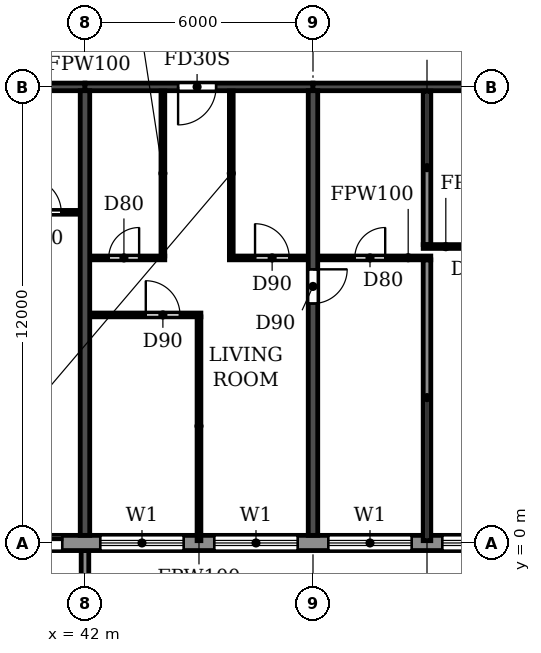
"""IFC4 building model, lengths in metres.
Left out: names, types, materials, properties, quantities, classifications, styles, units other than length and angle.
Written with IfcOpenShell. Run it as: python <this file> out.ifc"""

import sys

from ifc_helpers import new_model, si_unit, direction, frame, frame_2d, origin, place, context, subcontext, project, spatial, polyline, rectangle, outline, extrude, source, transform, mapped, element, fill, save


model = new_model("IFC4")
c1 = context("Model", 3, precision=1e-05, world=origin(), true_north=direction((0.0, 1.0)))
c2 = subcontext(c1, "Body", "Model", "MODEL_VIEW")
j1 = project(units=[si_unit("LENGTHUNIT", "METRE"), si_unit("PLANEANGLEUNIT", "RADIAN")], contexts=[c1])
p1 = place(None, origin())
s1 = spatial("IfcSite", under=j1, at=p1, CompositionType="ELEMENT")
p2 = place(p1, origin())
s2 = spatial("IfcBuilding", under=s1, at=p2, CompositionType="ELEMENT")
p3 = place(p2, frame((0.0, 0.0, 241.2)))
s3 = spatial("IfcBuildingStorey", under=s2, at=p3, CompositionType="ELEMENT", Elevation=241.2)
p4 = place(p3, frame((42.0, 0.2, 0.0), z_axis=(0.0, 0.0, 1.0), x_axis=(0.0, 1.0, 0.0)))
e1 = element("IfcWall", 1, at=p4, inside=s3, PredefinedType="SHEAR", context=c2, shape_type="SweptSolid", body=[
    extrude(rectangle(XDim=11.7, YDim=0.25, at=frame_2d((5.85, 0.0))), origin(), (0.0, 0.0, 1.0), 3.08),
])
p5 = place(p3, frame((48.0, 0.2, 0.0), z_axis=(0.0, 0.0, 1.0), x_axis=(0.0, 1.0, 0.0)))
e2 = element("IfcWall", 2, at=p5, inside=s3, PredefinedType="SHEAR", context=c2, shape_type="SweptSolid", body=[
    extrude(rectangle(XDim=11.7, YDim=0.25, at=frame_2d((5.85, 0.0))), origin(), (0.0, 0.0, 1.0), 3.08),
])
p6 = place(p5, frame((6.1, 0.0, 0.0)))
e3 = element("IfcOpeningElement", 3, at=p6, cuts=e2, PredefinedType="OPENING", context=c2, shape_type="SweptSolid", body=[
    extrude(rectangle(XDim=0.9, YDim=2.1, at=frame_2d((0.45, 1.05))), frame((0.0, 0.135, 0.0), z_axis=(0.0, -1.0, 0.0), x_axis=(1.0, 0.0, 0.0)), (0.0, 0.0, 1.0), 0.27),
])
p7 = place(p3, frame((36.0, 12.0, 0.0), z_axis=(0.0, 0.0, 1.0), x_axis=(1.0, 0.0, 0.0)))
e4 = element("IfcWall", 4, at=p7, inside=s3, PredefinedType="SHEAR", context=c2, shape_type="SweptSolid", body=[
    extrude(rectangle(XDim=6.0, YDim=0.2, at=frame_2d((3.0, 0.0))), origin(), (0.0, 0.0, 1.0), 2.48),
])
p8 = place(p7, frame((2.45, 0.0, 0.0)))
e5 = element("IfcOpeningElement", 5, at=p8, cuts=e4, PredefinedType="OPENING", context=c2, shape_type="SweptSolid", body=[
    extrude(rectangle(XDim=1.0, YDim=2.1, at=frame_2d((0.5, 1.05))), frame((0.0, 0.11, 0.0), z_axis=(0.0, -1.0, 0.0), x_axis=(1.0, 0.0, 0.0)), (0.0, 0.0, 1.0), 0.22),
])
p9 = place(p3, frame((42.0, 12.0, 0.0), z_axis=(0.0, 0.0, 1.0), x_axis=(1.0, 0.0, 0.0)))
e6 = element("IfcWall", 6, at=p9, inside=s3, PredefinedType="SHEAR", context=c2, shape_type="SweptSolid", body=[
    extrude(rectangle(XDim=6.0, YDim=0.2, at=frame_2d((3.0, 0.0))), origin(), (0.0, 0.0, 1.0), 2.48),
])
p10 = place(p9, frame((2.45, 0.0, 0.0)))
e7 = element("IfcOpeningElement", 7, at=p10, cuts=e6, PredefinedType="OPENING", context=c2, shape_type="SweptSolid", body=[
    extrude(rectangle(XDim=1.0, YDim=2.1, at=frame_2d((0.5, 1.05))), frame((0.0, 0.11, 0.0), z_axis=(0.0, -1.0, 0.0), x_axis=(1.0, 0.0, 0.0)), (0.0, 0.0, 1.0), 0.22),
])
p11 = place(p3, frame((48.0, 12.0, 0.0), z_axis=(0.0, 0.0, 1.0), x_axis=(1.0, 0.0, 0.0)))
e8 = element("IfcWall", 8, at=p11, inside=s3, PredefinedType="SHEAR", context=c2, shape_type="SweptSolid", body=[
    extrude(rectangle(XDim=6.0, YDim=0.2, at=frame_2d((3.0, 0.0))), origin(), (0.0, 0.0, 1.0), 2.48),
])
p12 = place(p3, frame((22.683, 0.0, 0.0), z_axis=(0.0, 0.0, 1.0), x_axis=(1.0, 0.0, 0.0)))
e9 = element("IfcWall", 9, at=p12, inside=s3, PredefinedType="STANDARD", context=c2, shape_type="SweptSolid", body=[
    extrude(rectangle(XDim=56.634, YDim=0.4, at=frame_2d((28.317, 0.0))), origin(), (0.0, 0.0, 1.0), 3.08),
])
p13 = place(p12, frame((1.717, 0.0, 0.9)))
e10 = element("IfcOpeningElement", 10, at=p13, cuts=e9, PredefinedType="OPENING", context=c2, shape_type="SweptSolid", body=[
    extrude(rectangle(XDim=2.2, YDim=1.5, at=frame_2d((1.1, 0.75))), frame((0.0, 0.21, 0.0), z_axis=(0.0, -1.0, 0.0), x_axis=(1.0, 0.0, 0.0)), (0.0, 0.0, 1.0), 0.42),
])
p14 = place(p12, frame((4.917, 0.0, 0.0)))
e11 = element("IfcOpeningElement", 11, at=p14, cuts=e9, PredefinedType="OPENING", context=c2, shape_type="SweptSolid", body=[
    extrude(rectangle(XDim=1.8, YDim=2.4, at=frame_2d((0.9, 1.2))), frame((0.0, 0.21, 0.0), z_axis=(0.0, -1.0, 0.0), x_axis=(1.0, 0.0, 0.0)), (0.0, 0.0, 1.0), 0.42),
])
p15 = place(p12, frame((7.717, 0.0, 0.9)))
e12 = element("IfcOpeningElement", 12, at=p15, cuts=e9, PredefinedType="OPENING", context=c2, shape_type="SweptSolid", body=[
    extrude(rectangle(XDim=2.2, YDim=1.5, at=frame_2d((1.1, 0.75))), frame((0.0, 0.21, 0.0), z_axis=(0.0, -1.0, 0.0), x_axis=(1.0, 0.0, 0.0)), (0.0, 0.0, 1.0), 0.42),
])
p16 = place(p12, frame((10.717, 0.0, 0.9)))
e13 = element("IfcOpeningElement", 13, at=p16, cuts=e9, PredefinedType="OPENING", context=c2, shape_type="SweptSolid", body=[
    extrude(rectangle(XDim=2.2, YDim=1.5, at=frame_2d((1.1, 0.75))), frame((0.0, 0.21, 0.0), z_axis=(0.0, -1.0, 0.0), x_axis=(1.0, 0.0, 0.0)), (0.0, 0.0, 1.0), 0.42),
])
p17 = place(p12, frame((13.717, 0.0, 0.9)))
e14 = element("IfcOpeningElement", 14, at=p17, cuts=e9, PredefinedType="OPENING", context=c2, shape_type="SweptSolid", body=[
    extrude(rectangle(XDim=2.2, YDim=1.5, at=frame_2d((1.1, 0.75))), frame((0.0, 0.21, 0.0), z_axis=(0.0, -1.0, 0.0), x_axis=(1.0, 0.0, 0.0)), (0.0, 0.0, 1.0), 0.42),
])
p18 = place(p12, frame((16.917, 0.0, 0.0)))
e15 = element("IfcOpeningElement", 15, at=p18, cuts=e9, PredefinedType="OPENING", context=c2, shape_type="SweptSolid", body=[
    extrude(rectangle(XDim=1.8, YDim=2.4, at=frame_2d((0.9, 1.2))), frame((0.0, 0.21, 0.0), z_axis=(0.0, -1.0, 0.0), x_axis=(1.0, 0.0, 0.0)), (0.0, 0.0, 1.0), 0.42),
])
p19 = place(p12, frame((19.717, 0.0, 0.9)))
e16 = element("IfcOpeningElement", 16, at=p19, cuts=e9, PredefinedType="OPENING", context=c2, shape_type="SweptSolid", body=[
    extrude(rectangle(XDim=2.2, YDim=1.5, at=frame_2d((1.1, 0.75))), frame((0.0, 0.21, 0.0), z_axis=(0.0, -1.0, 0.0), x_axis=(1.0, 0.0, 0.0)), (0.0, 0.0, 1.0), 0.42),
])
p20 = place(p12, frame((22.717, 0.0, 0.9)))
e17 = element("IfcOpeningElement", 17, at=p20, cuts=e9, PredefinedType="OPENING", context=c2, shape_type="SweptSolid", body=[
    extrude(rectangle(XDim=2.2, YDim=1.5, at=frame_2d((1.1, 0.75))), frame((0.0, 0.21, 0.0), z_axis=(0.0, -1.0, 0.0), x_axis=(1.0, 0.0, 0.0)), (0.0, 0.0, 1.0), 0.42),
])
p21 = place(p12, frame((25.717, 0.0, 0.9)))
e18 = element("IfcOpeningElement", 18, at=p21, cuts=e9, PredefinedType="OPENING", context=c2, shape_type="SweptSolid", body=[
    extrude(rectangle(XDim=2.2, YDim=1.5, at=frame_2d((1.1, 0.75))), frame((0.0, 0.21, 0.0), z_axis=(0.0, -1.0, 0.0), x_axis=(1.0, 0.0, 0.0)), (0.0, 0.0, 1.0), 0.42),
])
p22 = place(p12, frame((28.717, 0.0, 0.9)))
e19 = element("IfcOpeningElement", 19, at=p22, cuts=e9, PredefinedType="OPENING", context=c2, shape_type="SweptSolid", body=[
    extrude(rectangle(XDim=2.2, YDim=1.5, at=frame_2d((1.1, 0.75))), frame((0.0, 0.21, 0.0), z_axis=(0.0, -1.0, 0.0), x_axis=(1.0, 0.0, 0.0)), (0.0, 0.0, 1.0), 0.42),
])
p23 = place(p12, frame((31.717, 0.0, 0.9)))
e20 = element("IfcOpeningElement", 20, at=p23, cuts=e9, PredefinedType="OPENING", context=c2, shape_type="SweptSolid", body=[
    extrude(rectangle(XDim=2.2, YDim=1.5, at=frame_2d((1.1, 0.75))), frame((0.0, 0.21, 0.0), z_axis=(0.0, -1.0, 0.0), x_axis=(1.0, 0.0, 0.0)), (0.0, 0.0, 1.0), 0.42),
])
p24 = place(p12, frame((34.717, 0.0, 0.9)))
e21 = element("IfcOpeningElement", 21, at=p24, cuts=e9, PredefinedType="OPENING", context=c2, shape_type="SweptSolid", body=[
    extrude(rectangle(XDim=2.2, YDim=1.5, at=frame_2d((1.1, 0.75))), frame((0.0, 0.21, 0.0), z_axis=(0.0, -1.0, 0.0), x_axis=(1.0, 0.0, 0.0)), (0.0, 0.0, 1.0), 0.42),
])
p25 = place(p12, frame((37.917, 0.0, 0.0)))
e22 = element("IfcOpeningElement", 22, at=p25, cuts=e9, PredefinedType="OPENING", context=c2, shape_type="SweptSolid", body=[
    extrude(rectangle(XDim=1.8, YDim=2.4, at=frame_2d((0.9, 1.2))), frame((0.0, 0.21, 0.0), z_axis=(0.0, -1.0, 0.0), x_axis=(1.0, 0.0, 0.0)), (0.0, 0.0, 1.0), 0.42),
])
p26 = place(p12, frame((40.717, 0.0, 0.9)))
e23 = element("IfcOpeningElement", 23, at=p26, cuts=e9, PredefinedType="OPENING", context=c2, shape_type="SweptSolid", body=[
    extrude(rectangle(XDim=2.2, YDim=1.5, at=frame_2d((1.1, 0.75))), frame((0.0, 0.21, 0.0), z_axis=(0.0, -1.0, 0.0), x_axis=(1.0, 0.0, 0.0)), (0.0, 0.0, 1.0), 0.42),
])
p27 = place(p12, frame((43.717, 0.0, 0.9)))
e24 = element("IfcOpeningElement", 24, at=p27, cuts=e9, PredefinedType="OPENING", context=c2, shape_type="SweptSolid", body=[
    extrude(rectangle(XDim=2.2, YDim=1.5, at=frame_2d((1.1, 0.75))), frame((0.0, 0.21, 0.0), z_axis=(0.0, -1.0, 0.0), x_axis=(1.0, 0.0, 0.0)), (0.0, 0.0, 1.0), 0.42),
])
p28 = place(p12, frame((46.717, 0.0, 0.9)))
e25 = element("IfcOpeningElement", 25, at=p28, cuts=e9, PredefinedType="OPENING", context=c2, shape_type="SweptSolid", body=[
    extrude(rectangle(XDim=2.2, YDim=1.5, at=frame_2d((1.1, 0.75))), frame((0.0, 0.21, 0.0), z_axis=(0.0, -1.0, 0.0), x_axis=(1.0, 0.0, 0.0)), (0.0, 0.0, 1.0), 0.42),
])
p29 = place(p12, frame((49.717, 0.0, 0.9)))
e26 = element("IfcOpeningElement", 26, at=p29, cuts=e9, PredefinedType="OPENING", context=c2, shape_type="SweptSolid", body=[
    extrude(rectangle(XDim=2.2, YDim=1.5, at=frame_2d((1.1, 0.75))), frame((0.0, 0.21, 0.0), z_axis=(0.0, -1.0, 0.0), x_axis=(1.0, 0.0, 0.0)), (0.0, 0.0, 1.0), 0.42),
])
p30 = place(p12, frame((52.917, 0.0, 0.0)))
e27 = element("IfcOpeningElement", 27, at=p30, cuts=e9, PredefinedType="OPENING", context=c2, shape_type="SweptSolid", body=[
    extrude(rectangle(XDim=1.8, YDim=2.4, at=frame_2d((0.9, 1.2))), frame((0.0, 0.21, 0.0), z_axis=(0.0, -1.0, 0.0), x_axis=(1.0, 0.0, 0.0)), (0.0, 0.0, 1.0), 0.42),
])
m1 = source(origin(), c2, "Body", "SweptSolid", [
    extrude(outline(polyline([(0.0, 0.0), (0.2, 0.0), (0.2, 1.65), (0.0, 1.65), (0.0, 0.0)])), origin(), (0.0, 0.0, 1.0), 3.1),
])
p31 = place(p3, frame((41.9, -1.85, 0.0)))
e28 = element("IfcWall", 28, at=p31, inside=s3, PredefinedType="STANDARD", context=c2, shape_type="MappedRepresentation", body=[
    mapped(m1, transform((0.0, 0.0, 0.0))),
])
p32 = place(p3, frame((51.0, 0.06, 0.0), z_axis=(0.0, 0.0, 1.0), x_axis=(0.0, 1.0, 0.0)))
e29 = element("IfcWall", 29, at=p32, inside=s3, PredefinedType="PARTITIONING", context=c2, shape_type="SweptSolid", body=[
    extrude(rectangle(XDim=7.39, YDim=0.2, at=frame_2d((3.695, 0.0))), origin(), (0.0, 0.0, 1.0), 3.08),
])
p33 = place(p3, frame((51.0, 7.85, 0.0), z_axis=(0.0, 0.0, 1.0), x_axis=(0.0, 1.0, 0.0)))
e30 = element("IfcWall", 30, at=p33, inside=s3, PredefinedType="PARTITIONING", context=c2, shape_type="SweptSolid", body=[
    extrude(rectangle(XDim=4.04, YDim=0.2, at=frame_2d((2.02, 0.0))), origin(), (0.0, 0.0, 1.0), 3.08),
])
p34 = place(p3, frame((42.135, 6.0, 0.0), z_axis=(0.0, 0.0, 1.0), x_axis=(1.0, 0.0, 0.0)))
e31 = element("IfcWall", 31, at=p34, inside=s3, PredefinedType="PARTITIONING", context=c2, shape_type="SweptSolid", body=[
    extrude(rectangle(XDim=2.915, YDim=0.1, at=frame_2d((1.458, 0.0))), origin(), (0.0, 0.0, 1.0), 3.08),
])
p35 = place(p34, frame((1.465, 0.0, 0.0)))
e32 = element("IfcOpeningElement", 32, at=p35, cuts=e31, PredefinedType="OPENING", context=c2, shape_type="SweptSolid", body=[
    extrude(rectangle(XDim=0.9, YDim=2.1, at=frame_2d((0.45, 1.05))), frame((0.0, 0.06, 0.0), z_axis=(0.0, -1.0, 0.0), x_axis=(1.0, 0.0, 0.0)), (0.0, 0.0, 1.0), 0.12),
])
p36 = place(p3, frame((42.135, 7.5, 0.0), z_axis=(0.0, 0.0, 1.0), x_axis=(1.0, 0.0, 0.0)))
e33 = element("IfcWall", 33, at=p36, inside=s3, PredefinedType="PARTITIONING", context=c2, shape_type="SweptSolid", body=[
    extrude(rectangle(XDim=1.965, YDim=0.1, at=frame_2d((0.982, 0.0))), origin(), (0.0, 0.0, 1.0), 3.08),
])
p37 = place(p36, frame((0.49, 0.0, 0.0)))
e34 = element("IfcOpeningElement", 34, at=p37, cuts=e33, PredefinedType="OPENING", context=c2, shape_type="SweptSolid", body=[
    extrude(rectangle(XDim=0.8, YDim=2.1, at=frame_2d((0.4, 1.05))), frame((0.0, 0.06, 0.0), z_axis=(0.0, -1.0, 0.0), x_axis=(1.0, 0.0, 0.0)), (0.0, 0.0, 1.0), 0.12),
])
p38 = place(p3, frame((45.8, 7.5, 0.0), z_axis=(0.0, 0.0, 1.0), x_axis=(1.0, 0.0, 0.0)))
e35 = element("IfcWall", 35, at=p38, inside=s3, PredefinedType="PARTITIONING", context=c2, shape_type="SweptSolid", body=[
    extrude(rectangle(XDim=2.065, YDim=0.1, at=frame_2d((1.032, 0.0))), origin(), (0.0, 0.0, 1.0), 3.08),
])
p39 = place(p38, frame((0.675, 0.0, 0.0)))
e36 = element("IfcOpeningElement", 36, at=p39, cuts=e35, PredefinedType="OPENING", context=c2, shape_type="SweptSolid", body=[
    extrude(rectangle(XDim=0.9, YDim=2.1, at=frame_2d((0.45, 1.05))), frame((0.0, 0.06, 0.0), z_axis=(0.0, -1.0, 0.0), x_axis=(1.0, 0.0, 0.0)), (0.0, 0.0, 1.0), 0.12),
])
p40 = place(p3, frame((48.135, 7.5, 0.0), z_axis=(0.0, 0.0, 1.0), x_axis=(1.0, 0.0, 0.0)))
e37 = element("IfcWall", 37, at=p40, inside=s3, PredefinedType="PARTITIONING", context=c2, shape_type="SweptSolid", body=[
    extrude(rectangle(XDim=2.965, YDim=0.1, at=frame_2d((1.482, 0.0))), origin(), (0.0, 0.0, 1.0), 3.08),
])
p41 = place(p40, frame((0.965, 0.0, 0.0)))
e38 = element("IfcOpeningElement", 38, at=p41, cuts=e37, PredefinedType="OPENING", context=c2, shape_type="SweptSolid", body=[
    extrude(rectangle(XDim=0.8, YDim=2.1, at=frame_2d((0.4, 1.05))), frame((0.0, 0.06, 0.0), z_axis=(0.0, -1.0, 0.0), x_axis=(1.0, 0.0, 0.0)), (0.0, 0.0, 1.0), 0.12),
])
p42 = place(p3, frame((50.9, 7.8, 0.0), z_axis=(0.0, 0.0, 1.0), x_axis=(1.0, 0.0, 0.0)))
e39 = element("IfcWall", 39, at=p42, inside=s3, PredefinedType="PARTITIONING", context=c2, shape_type="SweptSolid", body=[
    extrude(rectangle(XDim=2.965, YDim=0.1, at=frame_2d((1.482, 0.0))), origin(), (0.0, 0.0, 1.0), 3.08),
])
p43 = place(p42, frame((1.2, 0.0, 0.0)))
e40 = element("IfcOpeningElement", 40, at=p43, cuts=e39, PredefinedType="OPENING", context=c2, shape_type="SweptSolid", body=[
    extrude(rectangle(XDim=0.8, YDim=2.1, at=frame_2d((0.4, 1.05))), frame((0.0, 0.06, 0.0), z_axis=(0.0, -1.0, 0.0), x_axis=(1.0, 0.0, 0.0)), (0.0, 0.0, 1.0), 0.12),
])
p44 = place(p3, frame((39.8, 8.7, 0.0), z_axis=(0.0, 0.0, 1.0), x_axis=(1.0, 0.0, 0.0)))
e41 = element("IfcWall", 41, at=p44, inside=s3, PredefinedType="PARTITIONING", context=c2, shape_type="SweptSolid", body=[
    extrude(rectangle(XDim=2.065, YDim=0.1, at=frame_2d((1.032, 0.0))), origin(), (0.0, 0.0, 1.0), 3.08),
])
p45 = place(p44, frame((0.675, 0.0, 0.0)))
e42 = element("IfcOpeningElement", 42, at=p45, cuts=e41, PredefinedType="OPENING", context=c2, shape_type="SweptSolid", body=[
    extrude(rectangle(XDim=0.9, YDim=2.1, at=frame_2d((0.45, 1.05))), frame((0.0, 0.06, 0.0), z_axis=(0.0, -1.0, 0.0), x_axis=(1.0, 0.0, 0.0)), (0.0, 0.0, 1.0), 0.12),
])
p46 = place(p3, frame((44.05, 7.55, 0.0), z_axis=(0.0, 0.0, 1.0), x_axis=(0.0, 1.0, 0.0)))
e43 = element("IfcWall", 43, at=p46, inside=s3, PredefinedType="PARTITIONING", context=c2, shape_type="SweptSolid", body=[
    extrude(rectangle(XDim=4.34, YDim=0.1, at=frame_2d((2.17, 0.0))), origin(), (0.0, 0.0, 1.0), 3.08),
])
p47 = place(p3, frame((45.0, 0.06, 0.0), z_axis=(0.0, 0.0, 1.0), x_axis=(0.0, 1.0, 0.0)))
e44 = element("IfcWall", 44, at=p47, inside=s3, PredefinedType="PARTITIONING", context=c2, shape_type="SweptSolid", body=[
    extrude(rectangle(XDim=5.89, YDim=0.1, at=frame_2d((2.945, 0.0))), origin(), (0.0, 0.0, 1.0), 3.08),
])
p48 = place(p3, frame((45.85, 7.55, 0.0), z_axis=(0.0, 0.0, 1.0), x_axis=(0.0, 1.0, 0.0)))
e45 = element("IfcWall", 45, at=p48, inside=s3, PredefinedType="PARTITIONING", context=c2, shape_type="SweptSolid", body=[
    extrude(rectangle(XDim=4.34, YDim=0.1, at=frame_2d((2.17, 0.0))), origin(), (0.0, 0.0, 1.0), 3.08),
])
p49 = place(p18, origin())
e46 = element("IfcDoor", 46, at=p49, inside=s3, OperationType="DOUBLE_DOOR_SLIDING", PredefinedType="DOOR", context=c2, shape_type="SweptSolid", body=[
    extrude(rectangle(XDim=1.8, YDim=2.4, at=frame_2d((0.9, 1.2))), frame((0.0, 0.025, 0.0), z_axis=(0.0, -1.0, 0.0), x_axis=(1.0, 0.0, 0.0)), (0.0, 0.0, 1.0), 0.05),
])
fill(e15, e46)
p50 = place(p19, origin())
e47 = element("IfcWindow", 47, at=p50, inside=s3, PartitioningType="DOUBLE_PANEL_HORIZONTAL", PredefinedType="WINDOW", context=c2, shape_type="SweptSolid", body=[
    extrude(rectangle(XDim=2.2, YDim=1.5, at=frame_2d((1.1, 0.75))), frame((0.0, 0.03, 0.0), z_axis=(0.0, -1.0, 0.0), x_axis=(1.0, 0.0, 0.0)), (0.0, 0.0, 1.0), 0.06),
])
fill(e16, e47)
p51 = place(p20, origin())
e48 = element("IfcWindow", 48, at=p51, inside=s3, PartitioningType="DOUBLE_PANEL_HORIZONTAL", PredefinedType="WINDOW", context=c2, shape_type="SweptSolid", body=[
    extrude(rectangle(XDim=2.2, YDim=1.5, at=frame_2d((1.1, 0.75))), frame((0.0, 0.03, 0.0), z_axis=(0.0, -1.0, 0.0), x_axis=(1.0, 0.0, 0.0)), (0.0, 0.0, 1.0), 0.06),
])
fill(e17, e48)
p52 = place(p21, origin())
e49 = element("IfcWindow", 49, at=p52, inside=s3, PartitioningType="DOUBLE_PANEL_HORIZONTAL", PredefinedType="WINDOW", context=c2, shape_type="SweptSolid", body=[
    extrude(rectangle(XDim=2.2, YDim=1.5, at=frame_2d((1.1, 0.75))), frame((0.0, 0.03, 0.0), z_axis=(0.0, -1.0, 0.0), x_axis=(1.0, 0.0, 0.0)), (0.0, 0.0, 1.0), 0.06),
])
fill(e18, e49)
p53 = place(p22, origin())
e50 = element("IfcWindow", 50, at=p53, inside=s3, PartitioningType="DOUBLE_PANEL_HORIZONTAL", PredefinedType="WINDOW", context=c2, shape_type="SweptSolid", body=[
    extrude(rectangle(XDim=2.2, YDim=1.5, at=frame_2d((1.1, 0.75))), frame((0.0, 0.03, 0.0), z_axis=(0.0, -1.0, 0.0), x_axis=(1.0, 0.0, 0.0)), (0.0, 0.0, 1.0), 0.06),
])
fill(e19, e50)
p54 = place(p45, origin())
e51 = element("IfcDoor", 51, at=p54, inside=s3, OperationType="SINGLE_SWING_LEFT", PredefinedType="DOOR", context=c2, shape_type="SweptSolid", body=[
    extrude(rectangle(XDim=0.9, YDim=2.1, at=frame_2d((0.45, 1.05))), frame((0.0, 0.025, 0.0), z_axis=(0.0, -1.0, 0.0), x_axis=(1.0, 0.0, 0.0)), (0.0, 0.0, 1.0), 0.05),
])
fill(e42, e51)
p55 = place(p41, origin())
e52 = element("IfcDoor", 52, at=p55, inside=s3, OperationType="SINGLE_SWING_RIGHT", PredefinedType="DOOR", context=c2, shape_type="SweptSolid", body=[
    extrude(rectangle(XDim=0.8, YDim=2.1, at=frame_2d((0.4, 1.05))), frame((0.0, 0.025, 0.0), z_axis=(0.0, -1.0, 0.0), x_axis=(1.0, 0.0, 0.0)), (0.0, 0.0, 1.0), 0.05),
])
fill(e38, e52)
p56 = place(p37, origin())
e53 = element("IfcDoor", 53, at=p56, inside=s3, OperationType="SINGLE_SWING_RIGHT", PredefinedType="DOOR", context=c2, shape_type="SweptSolid", body=[
    extrude(rectangle(XDim=0.8, YDim=2.1, at=frame_2d((0.4, 1.05))), frame((0.0, 0.025, 0.0), z_axis=(0.0, -1.0, 0.0), x_axis=(1.0, 0.0, 0.0)), (0.0, 0.0, 1.0), 0.05),
])
fill(e34, e53)
p57 = place(p35, origin())
e54 = element("IfcDoor", 54, at=p57, inside=s3, OperationType="SINGLE_SWING_LEFT", PredefinedType="DOOR", context=c2, shape_type="SweptSolid", body=[
    extrude(rectangle(XDim=0.9, YDim=2.1, at=frame_2d((0.45, 1.05))), frame((0.0, 0.025, 0.0), z_axis=(0.0, -1.0, 0.0), x_axis=(1.0, 0.0, 0.0)), (0.0, 0.0, 1.0), 0.05),
])
fill(e32, e54)
p58 = place(p10, frame((1.0, 0.0, 0.0), z_axis=(0.0, 0.0, 1.0), x_axis=(-1.0, 0.0, 0.0)))
e55 = element("IfcDoor", 55, at=p58, inside=s3, OperationType="SINGLE_SWING_RIGHT", PredefinedType="DOOR", context=c2, shape_type="SweptSolid", body=[
    extrude(rectangle(XDim=1.0, YDim=2.1, at=frame_2d((0.5, 1.05))), frame((0.0, 0.025, 0.0), z_axis=(0.0, -1.0, 0.0), x_axis=(1.0, 0.0, 0.0)), (0.0, 0.0, 1.0), 0.05),
])
fill(e7, e55)
p59 = place(p39, origin())
e56 = element("IfcDoor", 56, at=p59, inside=s3, OperationType="SINGLE_SWING_LEFT", PredefinedType="DOOR", context=c2, shape_type="SweptSolid", body=[
    extrude(rectangle(XDim=0.9, YDim=2.1, at=frame_2d((0.45, 1.05))), frame((0.0, 0.025, 0.0), z_axis=(0.0, -1.0, 0.0), x_axis=(1.0, 0.0, 0.0)), (0.0, 0.0, 1.0), 0.05),
])
fill(e36, e56)
p60 = place(p6, frame((0.9, 0.0, 0.0), z_axis=(0.0, 0.0, 1.0), x_axis=(-1.0, 0.0, 0.0)))
e57 = element("IfcDoor", 57, at=p60, inside=s3, OperationType="SINGLE_SWING_LEFT", PredefinedType="DOOR", context=c2, shape_type="SweptSolid", body=[
    extrude(rectangle(XDim=0.9, YDim=2.1, at=frame_2d((0.45, 1.05))), frame((0.0, 0.025, 0.0), z_axis=(0.0, -1.0, 0.0), x_axis=(1.0, 0.0, 0.0)), (0.0, 0.0, 1.0), 0.05),
])
fill(e3, e57)
save(model, sys.argv[1])
